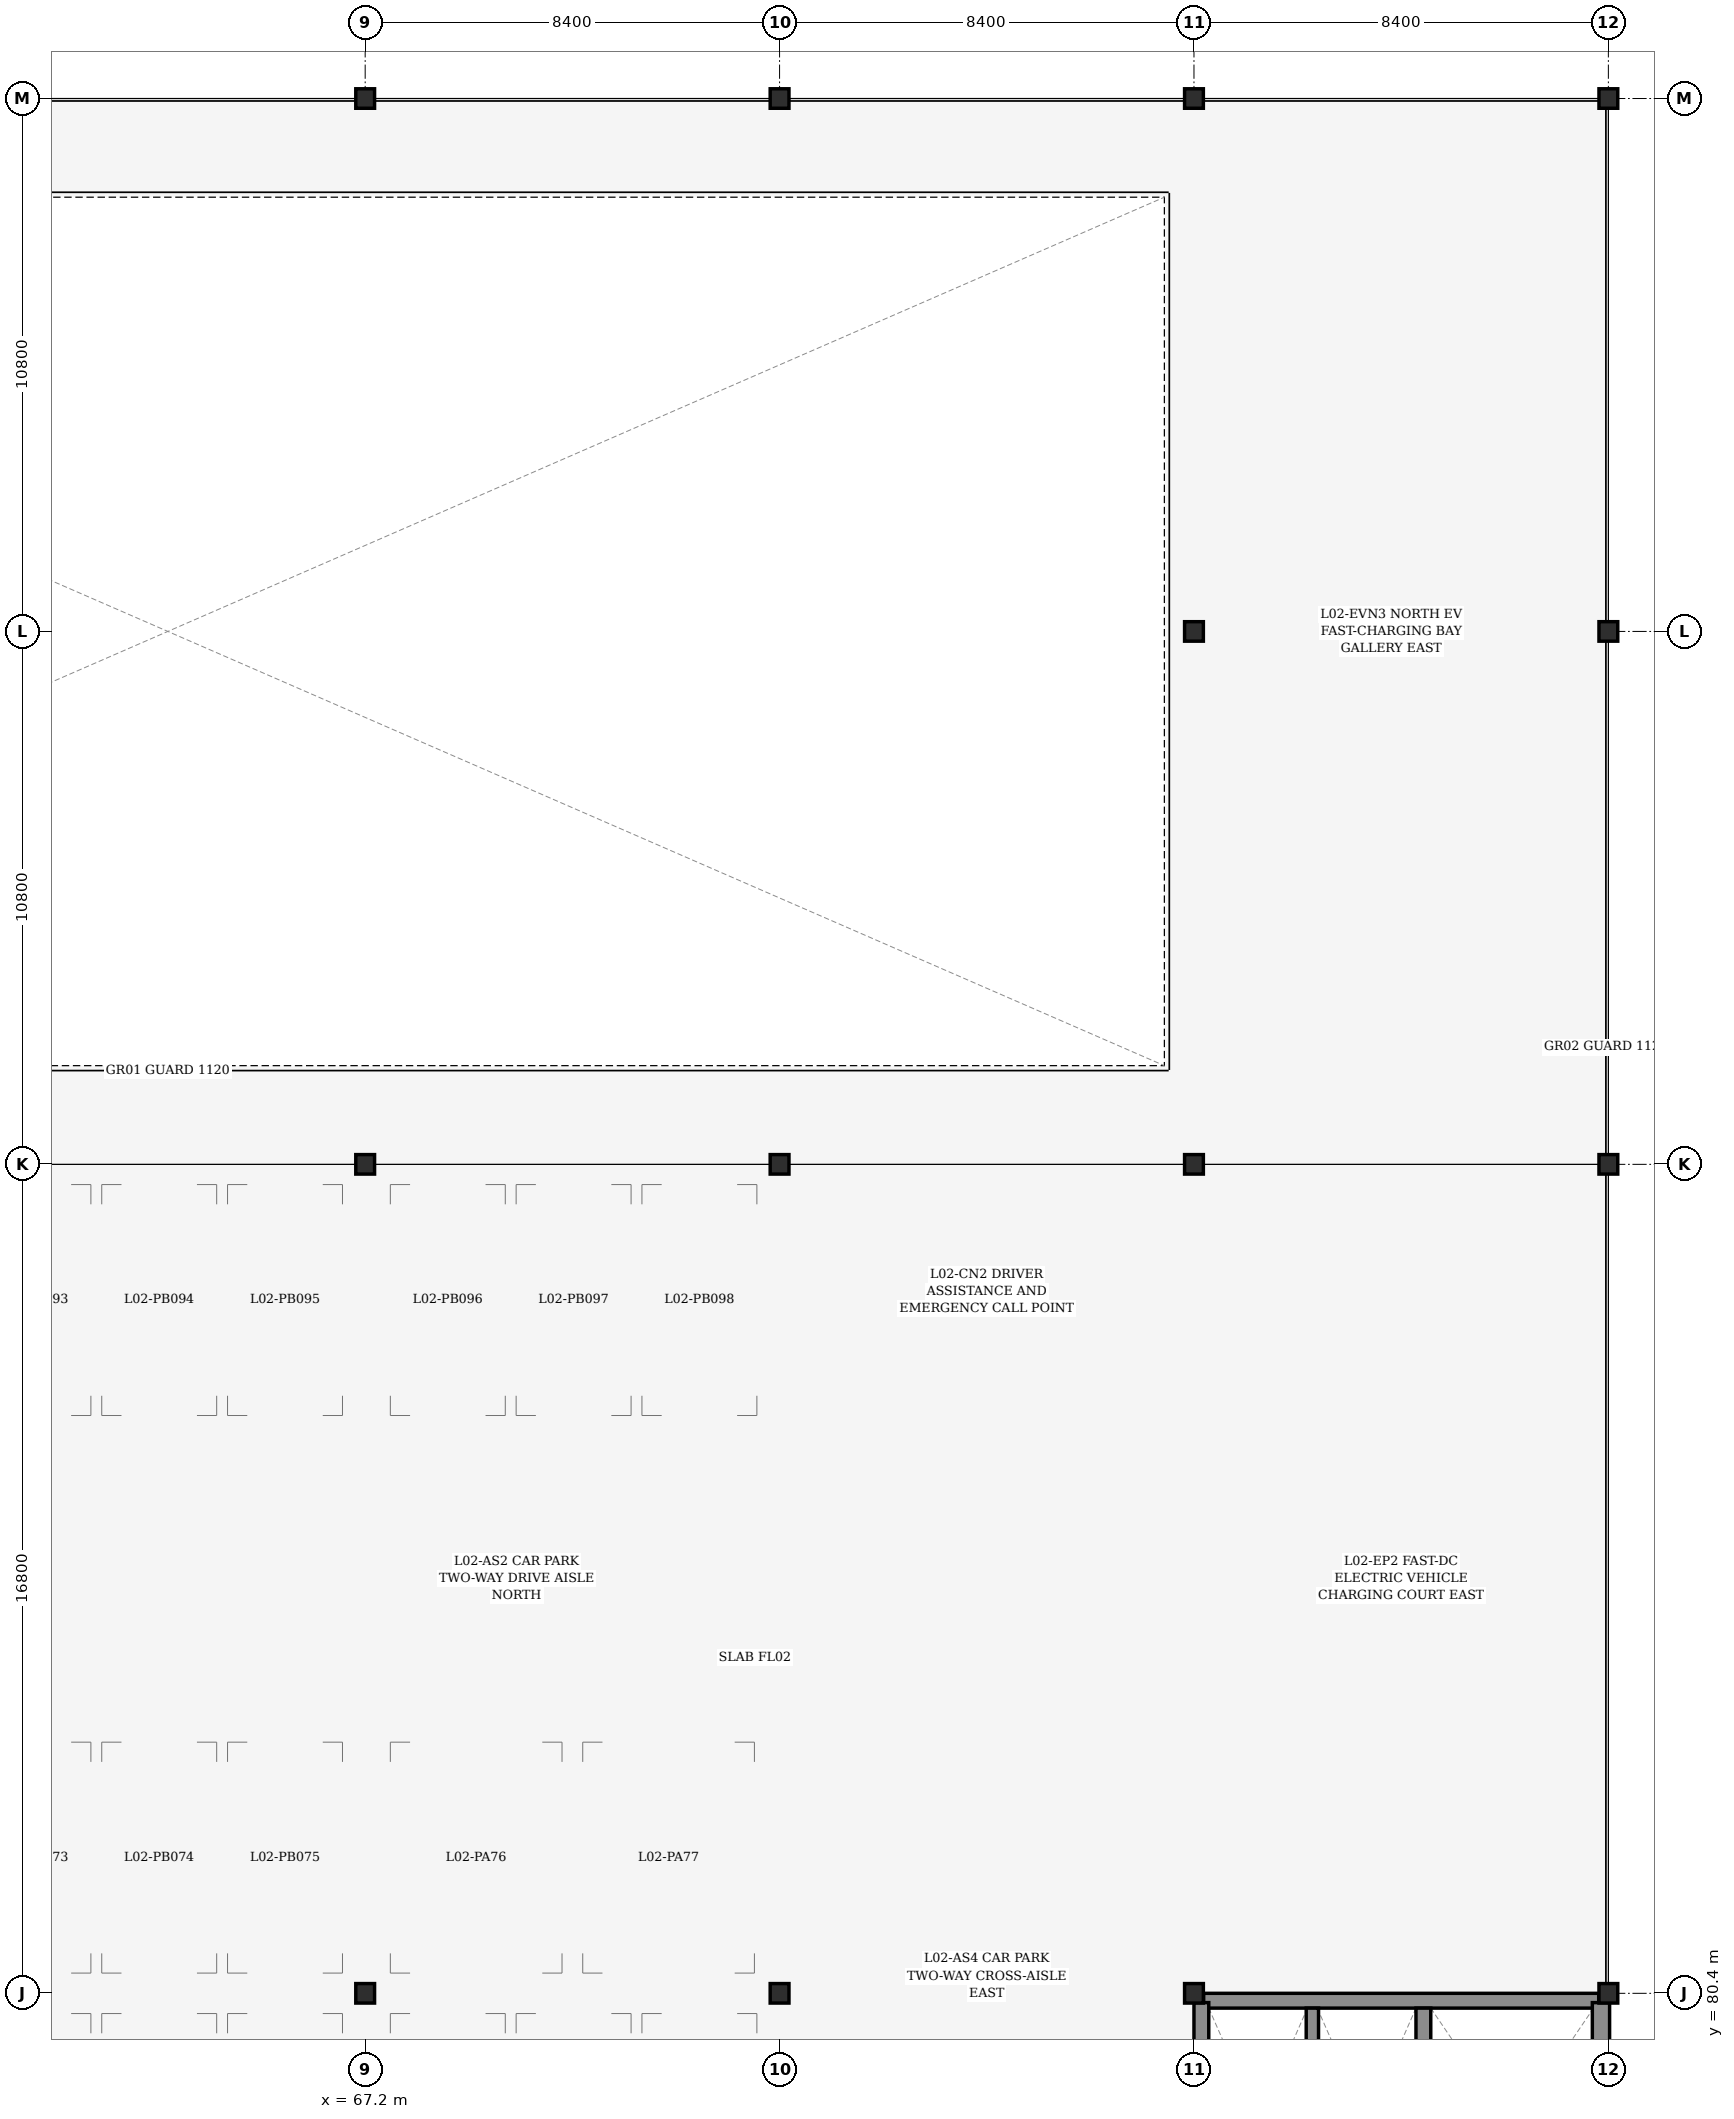
"""IFC4 building model, lengths in metres.
Left out: names, types, materials, properties, quantities, classifications, styles, units other than length and angle.
Written with IfcOpenShell. Run it as: python <this file> out.ifc"""

import sys

from ifc_helpers import new_model, si_unit, direction, frame, frame_2d, origin, origin_2d, place, context, subcontext, project, spatial, rectangle, i_section, extrude, element, save


model = new_model("IFC4")
c1 = context("Model", 3, precision=1e-05, world=origin(), true_north=direction((0.0, 1.0)))
c2 = subcontext(c1, "Body", "Model", "MODEL_VIEW")
j1 = project(units=[si_unit("LENGTHUNIT", "METRE"), si_unit("PLANEANGLEUNIT", "RADIAN")], contexts=[c1])
p1 = place(None, origin())
s1 = spatial("IfcSite", under=j1, at=p1, CompositionType="ELEMENT")
p2 = place(p1, origin())
s2 = spatial("IfcBuilding", under=s1, at=p2, CompositionType="ELEMENT")
p3 = place(p2, frame((0.0, 0.0, 9.0)))
s3 = spatial("IfcBuildingStorey", under=s2, at=p3, CompositionType="ELEMENT", Elevation=9.0)
for number, where, z_axis, x_axis in (
    (1, (67.2, 80.4, 0.0), (0.0, 0.0, 1.0), (1.0, 0.0, 0.0)),
    (2, (67.2, 97.2, 0.0), (0.0, 0.0, 1.0), (1.0, 0.0, 0.0)),
    (3, (67.2, 118.8, 0.0), (0.0, 0.0, 1.0), (1.0, 0.0, 0.0)),
    (4, (75.6, 80.4, 0.0), (0.0, 0.0, 1.0), (1.0, 0.0, 0.0)),
    (5, (75.6, 97.2, 0.0), (0.0, 0.0, 1.0), (1.0, 0.0, 0.0)),
    (6, (75.6, 118.8, 0.0), (0.0, 0.0, 1.0), (1.0, 0.0, 0.0)),
    (7, (84.0, 80.4, 0.0), (0.0, 0.0, 1.0), (1.0, 0.0, 0.0)),
    (8, (84.0, 97.2, 0.0), (0.0, 0.0, 1.0), (1.0, 0.0, 0.0)),
    (9, (84.0, 108.0, 0.0), (0.0, 0.0, 1.0), (1.0, 0.0, 0.0)),
    (10, (84.0, 118.8, 0.0), (0.0, 0.0, 1.0), (1.0, 0.0, 0.0)),
    (11, (92.4, 80.4, 0.0), (0.0, 0.0, 1.0), (1.0, 0.0, 0.0)),
    (12, (92.4, 97.2, 0.0), (0.0, 0.0, 1.0), (1.0, 0.0, 0.0)),
    (13, (92.4, 108.0, 0.0), (0.0, 0.0, 1.0), (1.0, 0.0, 0.0)),
    (14, (92.4, 118.8, 0.0), (0.0, 0.0, 1.0), (1.0, 0.0, 0.0)),
):
    element("IfcColumn", number, at=place(p3, frame(where, z_axis=z_axis, x_axis=x_axis)), inside=s3, PredefinedType="COLUMN", context=c2, shape_type="SweptSolid", body=[
        extrude(i_section(OverallWidth=0.395, OverallDepth=0.381, WebThickness=0.018, FlangeThickness=0.03, FilletRadius=0.015, at=origin_2d()), origin(), (0.0, 0.0, 1.0), 3.6),
    ])
p4 = place(p3, frame((84.196, 80.25, 0.0), z_axis=(0.0, 0.0, 1.0), x_axis=(1.0, 0.0, 0.0)))
e15 = element("IfcWall", 15, at=p4, inside=s3, PredefinedType="SHEAR", context=c2, shape_type="SweptSolid", body=[
    extrude(rectangle(XDim=8.009, YDim=0.3, at=frame_2d((4.004, 0.0))), origin(), (0.0, 0.0, 1.0), 3.38),
])
p5 = place(p3, frame((92.25, 63.789, 0.0), z_axis=(0.0, 0.0, 1.0), x_axis=(0.0, 1.0, 0.0)))
e16 = element("IfcWall", 16, at=p5, inside=s3, PredefinedType="SHEAR", context=c2, shape_type="SweptSolid", body=[
    extrude(rectangle(XDim=16.423, YDim=0.35, at=frame_2d((8.211, 0.0))), origin(), (0.0, 0.0, 1.0), 3.38),
])
p6 = place(p3, frame((84.15, 63.789, 0.0), z_axis=(0.0, 0.0, 1.0), x_axis=(0.0, 1.0, 0.0)))
e17 = element("IfcWall", 17, at=p6, inside=s3, PredefinedType="SHEAR", context=c2, shape_type="SweptSolid", body=[
    extrude(rectangle(XDim=16.423, YDim=0.3, at=frame_2d((8.211, 0.0))), origin(), (0.0, 0.0, 1.0), 3.38),
])
p7 = place(p6, frame((5.662, 0.0, 0.0)))
e18 = element("IfcOpeningElement", 18, at=p7, cuts=e17, PredefinedType="OPENING", context=c2, shape_type="SweptSolid", body=[
    extrude(rectangle(XDim=1.3, YDim=2.2, at=frame_2d((0.65, 1.1))), frame((0.0, 0.16, 0.0), z_axis=(0.0, -1.0, 0.0), x_axis=(1.0, 0.0, 0.0)), (0.0, 0.0, 1.0), 0.32),
])
p8 = place(p3, frame((88.65, 63.9, 0.0), z_axis=(0.0, 0.0, 1.0), x_axis=(0.0, 1.0, 0.0)))
e19 = element("IfcWall", 19, at=p8, inside=s3, PredefinedType="SHEAR", context=c2, shape_type="SweptSolid", body=[
    extrude(rectangle(XDim=16.2, YDim=0.3, at=frame_2d((8.1, 0.0))), origin(), (0.0, 0.0, 1.0), 3.38),
])
p9 = place(p8, frame((0.5, 0.0, 0.0)))
e20 = element("IfcOpeningElement", 20, at=p9, cuts=e19, PredefinedType="OPENING", context=c2, shape_type="SweptSolid", body=[
    extrude(rectangle(XDim=1.15, YDim=2.15, at=frame_2d((0.575, 1.075))), frame((0.0, 0.16, 0.0), z_axis=(0.0, -1.0, 0.0), x_axis=(1.0, 0.0, 0.0)), (0.0, 0.0, 1.0), 0.32),
])
p10 = place(p3, frame((86.4, 75.55, 0.0), z_axis=(0.0, 0.0, 1.0), x_axis=(0.0, 1.0, 0.0)))
e21 = element("IfcWall", 21, at=p10, inside=s3, PredefinedType="PARTITIONING", context=c2, shape_type="SweptSolid", body=[
    extrude(rectangle(XDim=4.55, YDim=0.25, at=frame_2d((2.275, 0.0))), origin(), (0.0, 0.0, 1.0), 2.525),
])
save(model, sys.argv[1])
